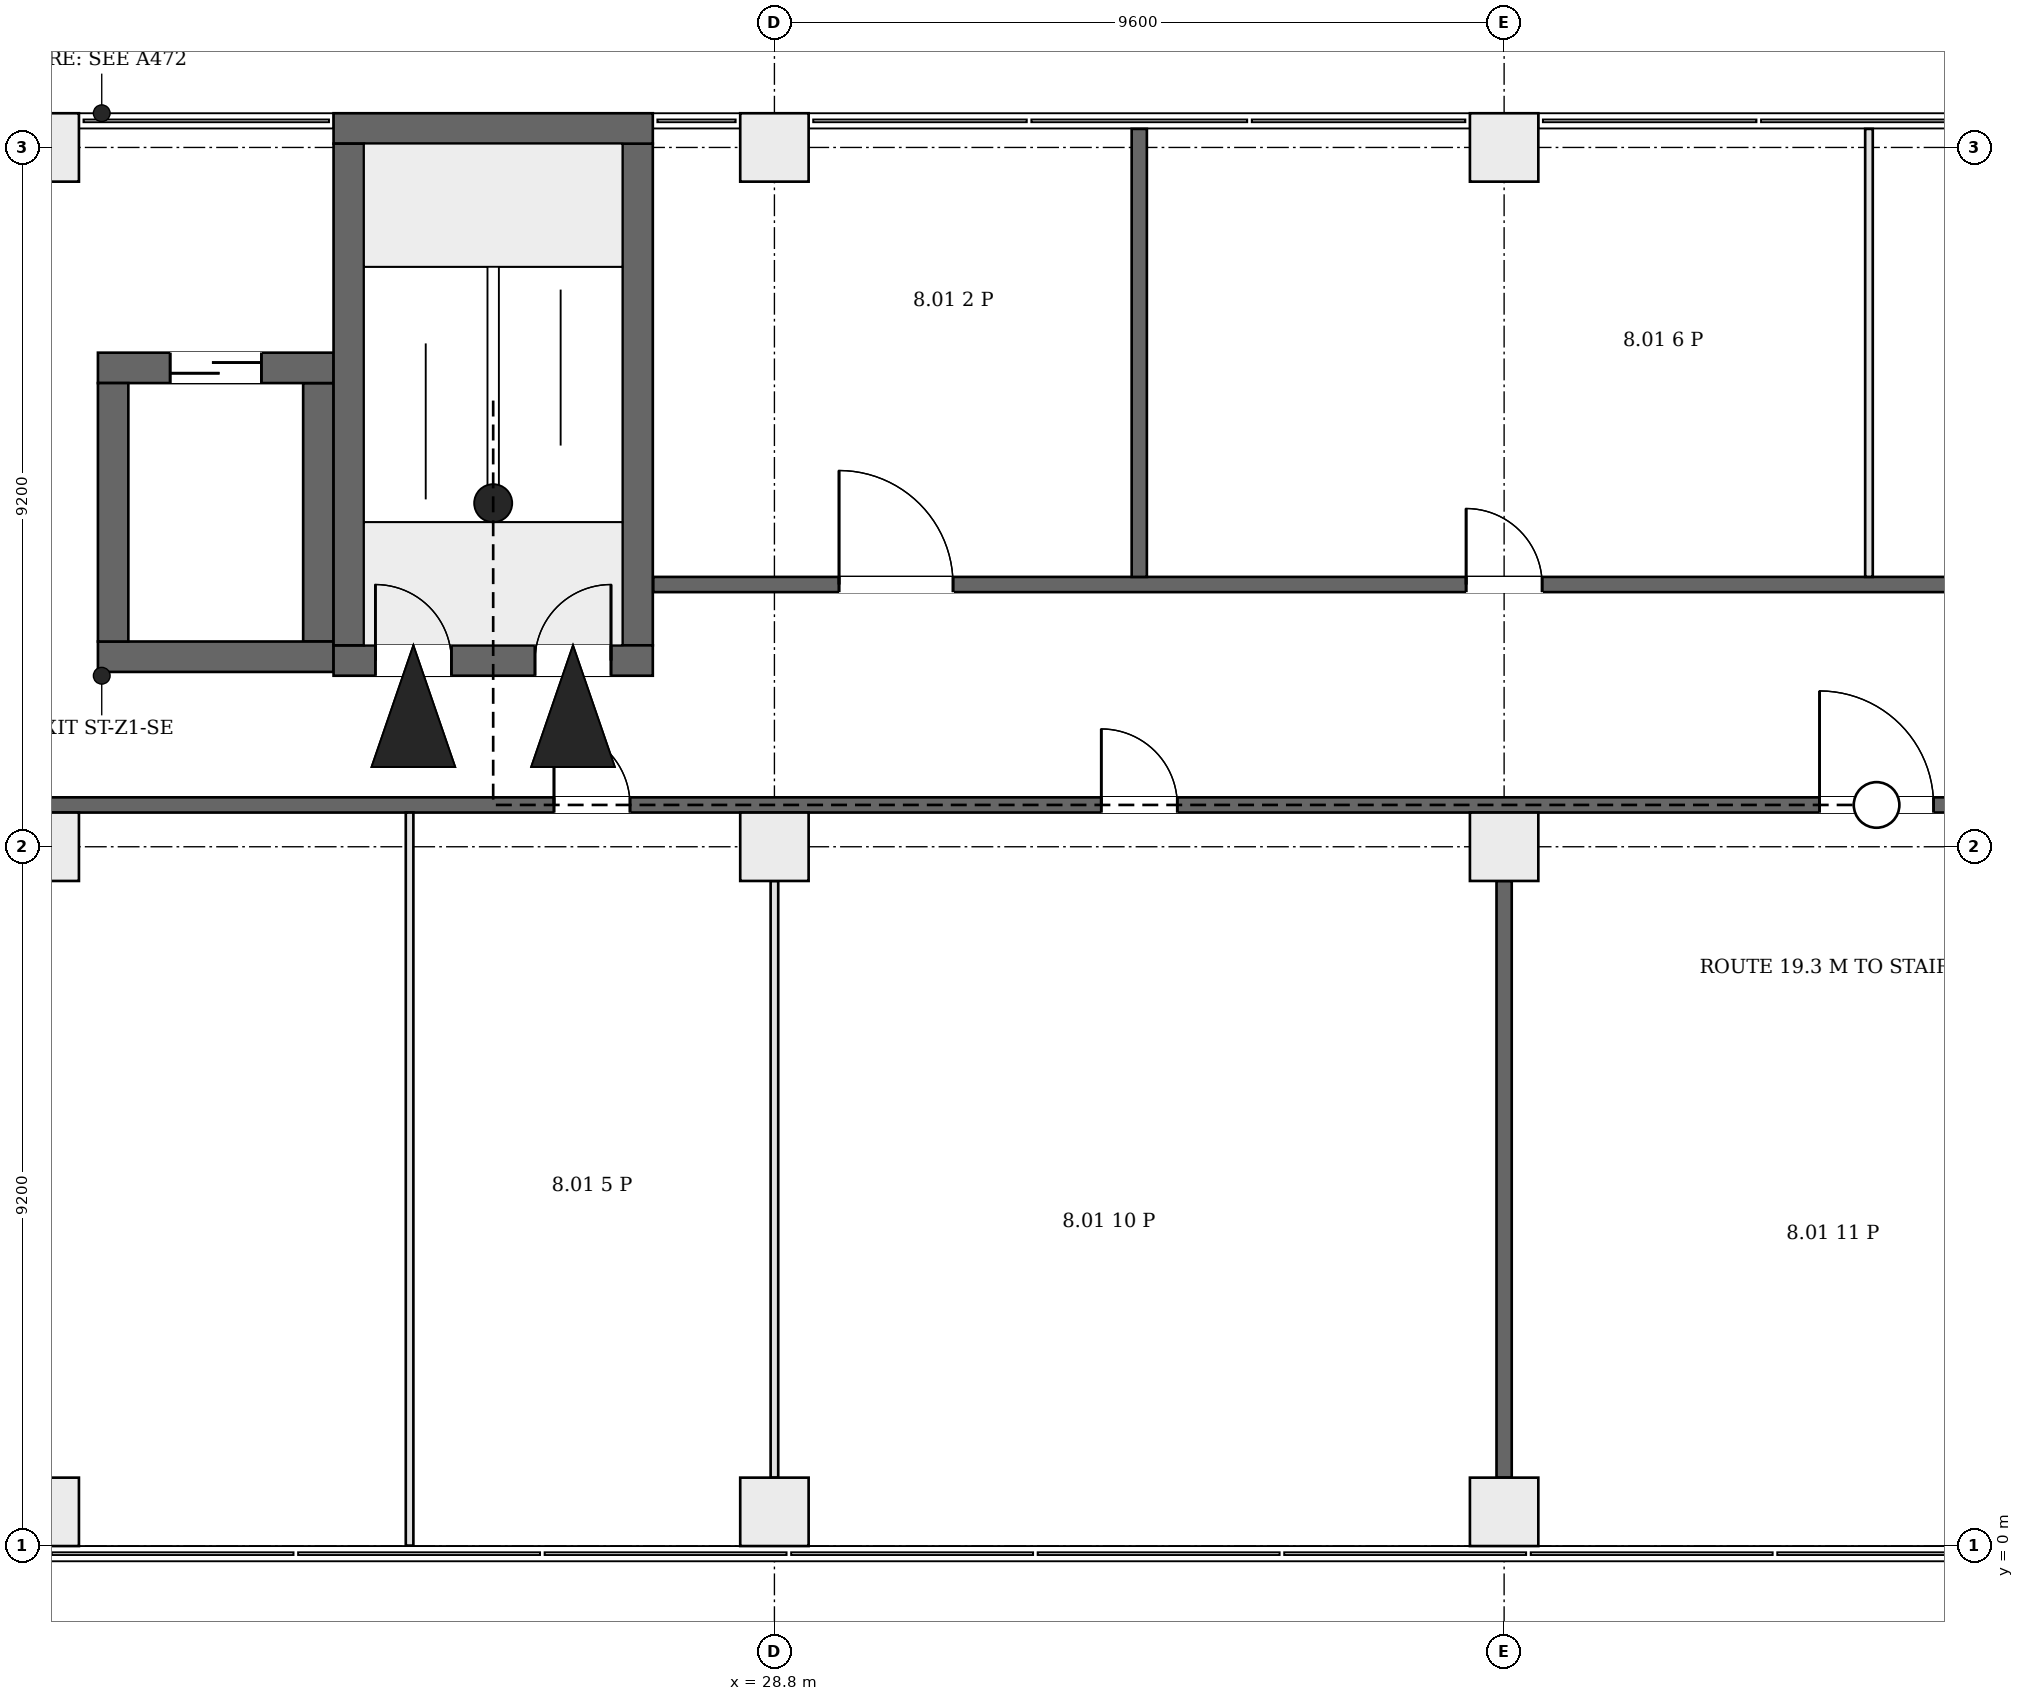
"""IFC4 building model, lengths in metres.
Left out: names, types, materials, properties, quantities, classifications, styles, units other than length and angle.
Written with IfcOpenShell. Run it as: python <this file> out.ifc"""

import sys

from ifc_helpers import new_model, si_unit, direction, frame, frame_2d, origin, origin_2d, place, context, subcontext, project, spatial, rectangle, extrude, element, fill, save


model = new_model("IFC4")
c1 = context("Model", 3, precision=1e-05, world=origin(), true_north=direction((0.0, 1.0)))
c2 = subcontext(c1, "Body", "Model", "MODEL_VIEW")
j1 = project(units=[si_unit("LENGTHUNIT", "METRE"), si_unit("PLANEANGLEUNIT", "RADIAN")], contexts=[c1])
p1 = place(None, origin())
s1 = spatial("IfcSite", under=j1, at=p1, CompositionType="ELEMENT")
p2 = place(p1, origin())
s2 = spatial("IfcBuilding", under=s1, at=p2, CompositionType="ELEMENT")
p3 = place(p2, frame((0.0, 0.0, 44.5)))
s3 = spatial("IfcBuildingStorey", under=s2, at=p3, CompositionType="ELEMENT", Elevation=44.5)
p4 = place(p3, frame((23.0, 11.65, 0.0), z_axis=(0.0, 0.0, 1.0), x_axis=(1.0, 0.0, 0.0)))
e1 = element("IfcWall", 1, at=p4, inside=s3, PredefinedType="SHEAR", context=c2, shape_type="SweptSolid", body=[
    extrude(rectangle(XDim=4.2, YDim=0.4, at=frame_2d((2.1, 0.0))), origin(), (0.0, 0.0, 1.0), 4.2),
])
p5 = place(p4, frame((0.55, 0.0, 0.0)))
e2 = element("IfcOpeningElement", 2, at=p5, cuts=e1, PredefinedType="OPENING", context=c2, shape_type="SweptSolid", body=[
    extrude(rectangle(XDim=1.0, YDim=2.1, at=frame_2d((0.5, 1.05))), frame((0.0, 0.21, 0.0), z_axis=(0.0, -1.0, 0.0), x_axis=(1.0, 0.0, 0.0)), (0.0, 0.0, 1.0), 0.42),
])
p6 = place(p4, frame((2.65, 0.0, 0.0)))
e3 = element("IfcOpeningElement", 3, at=p6, cuts=e1, PredefinedType="OPENING", context=c2, shape_type="SweptSolid", body=[
    extrude(rectangle(XDim=1.0, YDim=2.1, at=frame_2d((0.5, 1.05))), frame((0.0, 0.21, 0.0), z_axis=(0.0, -1.0, 0.0), x_axis=(1.0, 0.0, 0.0)), (0.0, 0.0, 1.0), 0.42),
])
p7 = place(p3, frame((23.0, 18.65, 0.0), z_axis=(0.0, 0.0, 1.0), x_axis=(1.0, 0.0, 0.0)))
e4 = element("IfcWall", 4, at=p7, inside=s3, PredefinedType="SHEAR", context=c2, shape_type="SweptSolid", body=[
    extrude(rectangle(XDim=4.2, YDim=0.4, at=frame_2d((2.1, 0.0))), origin(), (0.0, 0.0, 1.0), 4.2),
])
for number, where, z_axis, x_axis in (
    (5, (23.2, 11.85, 0.0), (0.0, 0.0, 1.0), (0.0, 1.0, 0.0)),
    (6, (27.0, 11.85, 0.0), (0.0, 0.0, 1.0), (0.0, 1.0, 0.0)),
):
    element("IfcWall", number, at=place(p3, frame(where, z_axis=z_axis, x_axis=x_axis)), inside=s3, PredefinedType="SHEAR", context=c2, shape_type="SweptSolid", body=[
        extrude(rectangle(XDim=6.6, YDim=0.4, at=frame_2d((3.3, 0.0))), origin(), (0.0, 0.0, 1.0), 4.2),
    ])
p8 = place(p3, frame((19.9, 11.7, 0.0), z_axis=(0.0, 0.0, 1.0), x_axis=(1.0, 0.0, 0.0)))
e7 = element("IfcWall", 7, at=p8, inside=s3, PredefinedType="SHEAR", context=c2, shape_type="SweptSolid", body=[
    extrude(rectangle(XDim=3.1, YDim=0.4, at=frame_2d((1.55, 0.0))), origin(), (0.0, 0.0, 1.0), 4.2),
])
p9 = place(p3, frame((19.9, 15.5, 0.0), z_axis=(0.0, 0.0, 1.0), x_axis=(1.0, 0.0, 0.0)))
e8 = element("IfcWall", 8, at=p9, inside=s3, PredefinedType="SHEAR", context=c2, shape_type="SweptSolid", body=[
    extrude(rectangle(XDim=3.1, YDim=0.4, at=frame_2d((1.55, 0.0))), origin(), (0.0, 0.0, 1.0), 4.2),
])
p10 = place(p9, frame((0.95, 0.0, 0.0)))
e9 = element("IfcOpeningElement", 9, at=p10, cuts=e8, PredefinedType="OPENING", context=c2, shape_type="SweptSolid", body=[
    extrude(rectangle(XDim=1.2, YDim=2.1, at=frame_2d((0.6, 1.05))), frame((0.0, 0.21, 0.0), z_axis=(0.0, -1.0, 0.0), x_axis=(1.0, 0.0, 0.0)), (0.0, 0.0, 1.0), 0.42),
])
for number, where, z_axis, x_axis in (
    (10, (20.1, 11.9, 0.0), (0.0, 0.0, 1.0), (0.0, 1.0, 0.0)),
    (11, (22.8, 11.9, 0.0), (0.0, 0.0, 1.0), (0.0, 1.0, 0.0)),
):
    element("IfcWall", number, at=place(p3, frame(where, z_axis=z_axis, x_axis=x_axis)), inside=s3, PredefinedType="SHEAR", context=c2, shape_type="SweptSolid", body=[
        extrude(rectangle(XDim=3.4, YDim=0.4, at=frame_2d((1.7, 0.0))), origin(), (0.0, 0.0, 1.0), 4.2),
    ])
for number, where, z_axis, x_axis in (
    (12, (19.2, 0.45, 0.0), (0.0, 0.0, 1.0), (1.0, 0.0, 0.0)),
    (13, (28.8, 0.45, 0.0), (0.0, 0.0, 1.0), (1.0, 0.0, 0.0)),
    (14, (38.4, 0.45, 0.0), (0.0, 0.0, 1.0), (1.0, 0.0, 0.0)),
    (15, (19.2, 9.2, 0.0), (0.0, 0.0, 1.0), (1.0, 0.0, 0.0)),
    (16, (28.8, 9.2, 0.0), (0.0, 0.0, 1.0), (1.0, 0.0, 0.0)),
    (17, (38.4, 9.2, 0.0), (0.0, 0.0, 1.0), (1.0, 0.0, 0.0)),
    (18, (19.2, 18.4, 0.0), (0.0, 0.0, 1.0), (1.0, 0.0, 0.0)),
    (19, (28.8, 18.4, 0.0), (0.0, 0.0, 1.0), (1.0, 0.0, 0.0)),
    (20, (38.4, 18.4, 0.0), (0.0, 0.0, 1.0), (1.0, 0.0, 0.0)),
):
    element("IfcColumn", number, at=place(p3, frame(where, z_axis=z_axis, x_axis=x_axis)), inside=s3, PredefinedType="COLUMN", context=c2, shape_type="SweptSolid", body=[
        extrude(rectangle(XDim=0.9, YDim=0.9, at=origin_2d()), origin(), (0.0, 0.0, 1.0), 4.2),
    ])
p11 = place(p3, frame((4.3, 9.75, 0.0), z_axis=(0.0, 0.0, 1.0), x_axis=(1.0, 0.0, 0.0)))
e21 = element("IfcWall", 21, at=p11, inside=s3, PredefinedType="PARTITIONING", context=c2, shape_type="SweptSolid", body=[
    extrude(rectangle(XDim=43.894, YDim=0.2, at=frame_2d((21.947, 0.0))), origin(), (0.0, 0.0, 1.0), 3.9),
])
p12 = place(p11, frame((2.2, 0.0, 0.0)))
e22 = element("IfcOpeningElement", 22, at=p12, cuts=e21, PredefinedType="OPENING", context=c2, shape_type="SweptSolid", body=[
    extrude(rectangle(XDim=1.0, YDim=2.1, at=frame_2d((0.5, 1.05))), frame((0.0, 0.11, 0.0), z_axis=(0.0, -1.0, 0.0), x_axis=(1.0, 0.0, 0.0)), (0.0, 0.0, 1.0), 0.22),
])
p13 = place(p11, frame((12.0, 0.0, 0.0)))
e23 = element("IfcOpeningElement", 23, at=p13, cuts=e21, PredefinedType="OPENING", context=c2, shape_type="SweptSolid", body=[
    extrude(rectangle(XDim=1.0, YDim=2.1, at=frame_2d((0.5, 1.05))), frame((0.0, 0.11, 0.0), z_axis=(0.0, -1.0, 0.0), x_axis=(1.0, 0.0, 0.0)), (0.0, 0.0, 1.0), 0.22),
])
p14 = place(p11, frame((21.6, 0.0, 0.0)))
e24 = element("IfcOpeningElement", 24, at=p14, cuts=e21, PredefinedType="OPENING", context=c2, shape_type="SweptSolid", body=[
    extrude(rectangle(XDim=1.0, YDim=2.1, at=frame_2d((0.5, 1.05))), frame((0.0, 0.11, 0.0), z_axis=(0.0, -1.0, 0.0), x_axis=(1.0, 0.0, 0.0)), (0.0, 0.0, 1.0), 0.22),
])
p15 = place(p11, frame((28.8, 0.0, 0.0)))
e25 = element("IfcOpeningElement", 25, at=p15, cuts=e21, PredefinedType="OPENING", context=c2, shape_type="SweptSolid", body=[
    extrude(rectangle(XDim=1.0, YDim=2.1, at=frame_2d((0.5, 1.05))), frame((0.0, 0.11, 0.0), z_axis=(0.0, -1.0, 0.0), x_axis=(1.0, 0.0, 0.0)), (0.0, 0.0, 1.0), 0.22),
])
p16 = place(p11, frame((38.25, 0.0, 0.0)))
e26 = element("IfcOpeningElement", 26, at=p16, cuts=e21, PredefinedType="OPENING", context=c2, shape_type="SweptSolid", body=[
    extrude(rectangle(XDim=1.5, YDim=2.1, at=frame_2d((0.75, 1.05))), frame((0.0, 0.11, 0.0), z_axis=(0.0, -1.0, 0.0), x_axis=(1.0, 0.0, 0.0)), (0.0, 0.0, 1.0), 0.22),
])
p17 = place(p3, frame((24.0, 0.006, 0.0), z_axis=(0.0, 0.0, 1.0), x_axis=(0.0, 1.0, 0.0)))
e27 = element("IfcWall", 27, at=p17, inside=s3, PredefinedType="PARTITIONING", context=c2, shape_type="SweptSolid", body=[
    extrude(rectangle(XDim=9.644, YDim=0.1, at=frame_2d((4.822, 0.0))), origin(), (0.0, 0.0, 1.0), 3.9),
])
p18 = place(p3, frame((27.206, 12.65, 0.0), z_axis=(0.0, 0.0, 1.0), x_axis=(1.0, 0.0, 0.0)))
e28 = element("IfcWall", 28, at=p18, inside=s3, PredefinedType="PARTITIONING", context=c2, shape_type="SweptSolid", body=[
    extrude(rectangle(XDim=20.988, YDim=0.2, at=frame_2d((10.494, 0.0))), origin(), (0.0, 0.0, 1.0), 3.9),
])
p19 = place(p18, frame((2.444, 0.0, 0.0)))
e29 = element("IfcOpeningElement", 29, at=p19, cuts=e28, PredefinedType="OPENING", context=c2, shape_type="SweptSolid", body=[
    extrude(rectangle(XDim=1.5, YDim=2.1, at=frame_2d((0.75, 1.05))), frame((0.0, 0.11, 0.0), z_axis=(0.0, -1.0, 0.0), x_axis=(1.0, 0.0, 0.0)), (0.0, 0.0, 1.0), 0.22),
])
p20 = place(p18, frame((10.694, 0.0, 0.0)))
e30 = element("IfcOpeningElement", 30, at=p20, cuts=e28, PredefinedType="OPENING", context=c2, shape_type="SweptSolid", body=[
    extrude(rectangle(XDim=1.0, YDim=2.1, at=frame_2d((0.5, 1.05))), frame((0.0, 0.11, 0.0), z_axis=(0.0, -1.0, 0.0), x_axis=(1.0, 0.0, 0.0)), (0.0, 0.0, 1.0), 0.22),
])
p21 = place(p18, frame((18.044, 0.0, 0.0)))
e31 = element("IfcOpeningElement", 31, at=p21, cuts=e28, PredefinedType="OPENING", context=c2, shape_type="SweptSolid", body=[
    extrude(rectangle(XDim=0.9, YDim=2.1, at=frame_2d((0.45, 1.05))), frame((0.0, 0.11, 0.0), z_axis=(0.0, -1.0, 0.0), x_axis=(1.0, 0.0, 0.0)), (0.0, 0.0, 1.0), 0.22),
])
p22 = place(p3, frame((28.8, 0.9, 0.0), z_axis=(0.0, 0.0, 1.0), x_axis=(0.0, 1.0, 0.0)))
e32 = element("IfcWall", 32, at=p22, inside=s3, PredefinedType="PARTITIONING", context=c2, shape_type="SweptSolid", body=[
    extrude(rectangle(XDim=7.85, YDim=0.1, at=frame_2d((3.925, 0.0))), origin(), (0.0, 0.0, 1.0), 3.9),
])
p23 = place(p3, frame((33.6, 12.75, 0.0), z_axis=(0.0, 0.0, 1.0), x_axis=(0.0, 1.0, 0.0)))
e33 = element("IfcWall", 33, at=p23, inside=s3, PredefinedType="PARTITIONING", context=c2, shape_type="SweptSolid", body=[
    extrude(rectangle(XDim=5.894, YDim=0.2, at=frame_2d((2.947, 0.0))), origin(), (0.0, 0.0, 1.0), 3.9),
])
p24 = place(p3, frame((38.4, 0.9, 0.0), z_axis=(0.0, 0.0, 1.0), x_axis=(0.0, 1.0, 0.0)))
e34 = element("IfcWall", 34, at=p24, inside=s3, PredefinedType="PARTITIONING", context=c2, shape_type="SweptSolid", body=[
    extrude(rectangle(XDim=7.85, YDim=0.2, at=frame_2d((3.925, 0.0))), origin(), (0.0, 0.0, 1.0), 3.9),
])
p25 = place(p3, frame((43.2, 12.75, 0.0), z_axis=(0.0, 0.0, 1.0), x_axis=(0.0, 1.0, 0.0)))
e35 = element("IfcWall", 35, at=p25, inside=s3, PredefinedType="PARTITIONING", context=c2, shape_type="SweptSolid", body=[
    extrude(rectangle(XDim=5.894, YDim=0.1, at=frame_2d((2.947, 0.0))), origin(), (0.0, 0.0, 1.0), 3.9),
])
p26 = place(p5, origin())
e36 = element("IfcDoor", 36, at=p26, inside=s3, OperationType="SINGLE_SWING_RIGHT", PredefinedType="DOOR", context=c2, shape_type="SweptSolid", body=[
    extrude(rectangle(XDim=1.0, YDim=2.1, at=frame_2d((0.5, 1.05))), frame((0.0, 0.025, 0.0), z_axis=(0.0, -1.0, 0.0), x_axis=(1.0, 0.0, 0.0)), (0.0, 0.0, 1.0), 0.05),
])
fill(e2, e36)
p27 = place(p6, origin())
e37 = element("IfcDoor", 37, at=p27, inside=s3, OperationType="SINGLE_SWING_LEFT", PredefinedType="DOOR", context=c2, shape_type="SweptSolid", body=[
    extrude(rectangle(XDim=1.0, YDim=2.1, at=frame_2d((0.5, 1.05))), frame((0.0, 0.025, 0.0), z_axis=(0.0, -1.0, 0.0), x_axis=(1.0, 0.0, 0.0)), (0.0, 0.0, 1.0), 0.05),
])
fill(e3, e37)
p28 = place(p10, origin())
e38 = element("IfcDoor", 38, at=p28, inside=s3, OperationType="DOUBLE_DOOR_SLIDING", PredefinedType="DOOR", context=c2, shape_type="SweptSolid", body=[
    extrude(rectangle(XDim=1.2, YDim=2.1, at=frame_2d((0.6, 1.05))), frame((0.0, 0.025, 0.0), z_axis=(0.0, -1.0, 0.0), x_axis=(1.0, 0.0, 0.0)), (0.0, 0.0, 1.0), 0.05),
])
fill(e9, e38)
p29 = place(p14, origin())
e39 = element("IfcDoor", 39, at=p29, inside=s3, OperationType="SINGLE_SWING_LEFT", PredefinedType="DOOR", context=c2, shape_type="SweptSolid", body=[
    extrude(rectangle(XDim=1.0, YDim=2.1, at=frame_2d((0.5, 1.05))), frame((0.0, 0.025, 0.0), z_axis=(0.0, -1.0, 0.0), x_axis=(1.0, 0.0, 0.0)), (0.0, 0.0, 1.0), 0.05),
])
fill(e24, e39)
p30 = place(p15, origin())
e40 = element("IfcDoor", 40, at=p30, inside=s3, OperationType="SINGLE_SWING_RIGHT", PredefinedType="DOOR", context=c2, shape_type="SweptSolid", body=[
    extrude(rectangle(XDim=1.0, YDim=2.1, at=frame_2d((0.5, 1.05))), frame((0.0, 0.025, 0.0), z_axis=(0.0, -1.0, 0.0), x_axis=(1.0, 0.0, 0.0)), (0.0, 0.0, 1.0), 0.05),
])
fill(e25, e40)
p31 = place(p16, origin())
e41 = element("IfcDoor", 41, at=p31, inside=s3, OperationType="DOUBLE_DOOR_SINGLE_SWING", PredefinedType="DOOR", context=c2, shape_type="SweptSolid", body=[
    extrude(rectangle(XDim=1.5, YDim=2.1, at=frame_2d((0.75, 1.05))), frame((0.0, 0.025, 0.0), z_axis=(0.0, -1.0, 0.0), x_axis=(1.0, 0.0, 0.0)), (0.0, 0.0, 1.0), 0.05),
])
fill(e26, e41)
p32 = place(p19, origin())
e42 = element("IfcDoor", 42, at=p32, inside=s3, OperationType="DOUBLE_DOOR_SINGLE_SWING", PredefinedType="DOOR", context=c2, shape_type="SweptSolid", body=[
    extrude(rectangle(XDim=1.5, YDim=2.1, at=frame_2d((0.75, 1.05))), frame((0.0, 0.025, 0.0), z_axis=(0.0, -1.0, 0.0), x_axis=(1.0, 0.0, 0.0)), (0.0, 0.0, 1.0), 0.05),
])
fill(e29, e42)
p33 = place(p20, origin())
e43 = element("IfcDoor", 43, at=p33, inside=s3, OperationType="SINGLE_SWING_RIGHT", PredefinedType="DOOR", context=c2, shape_type="SweptSolid", body=[
    extrude(rectangle(XDim=1.0, YDim=2.1, at=frame_2d((0.5, 1.05))), frame((0.0, 0.025, 0.0), z_axis=(0.0, -1.0, 0.0), x_axis=(1.0, 0.0, 0.0)), (0.0, 0.0, 1.0), 0.05),
])
fill(e30, e43)
save(model, sys.argv[1])
